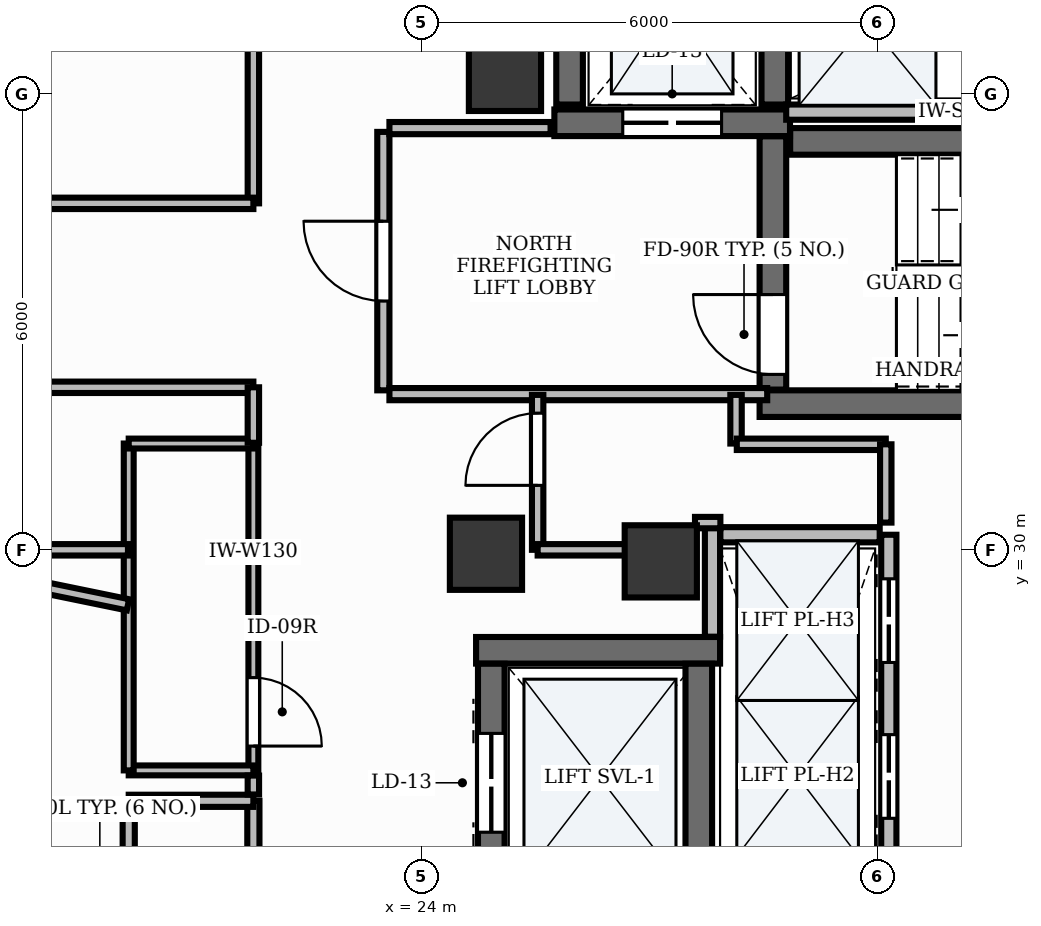
"""IFC4 building model, lengths in metres.
Left out: names, types, materials, properties, quantities, classifications, styles, units other than length and angle.
Written with IfcOpenShell. Run it as: python <this file> out.ifc"""

import sys

from ifc_helpers import new_model, si_unit, direction, frame, frame_2d, origin, origin_2d, place, context, subcontext, project, spatial, rectangle, extrude, element, fill, save


model = new_model("IFC4")
c1 = context("Model", 3, precision=1e-05, world=origin(), true_north=direction((0.0, 1.0)))
c2 = subcontext(c1, "Body", "Model", "MODEL_VIEW")
j1 = project(units=[si_unit("LENGTHUNIT", "METRE"), si_unit("PLANEANGLEUNIT", "RADIAN")], contexts=[c1])
p1 = place(None, origin())
s1 = spatial("IfcSite", under=j1, at=p1, CompositionType="ELEMENT")
p2 = place(p1, origin())
s2 = spatial("IfcBuilding", under=s1, at=p2, CompositionType="ELEMENT")
p3 = place(p2, frame((0.0, 0.0, 318.6)))
s3 = spatial("IfcBuildingStorey", under=s2, at=p3, CompositionType="ELEMENT", Elevation=318.6)
p4 = place(p3, frame((28.852, 35.375, 0.0), z_axis=(0.0, 0.0, 1.0), x_axis=(1.0, 0.0, 0.0)))
e1 = element("IfcWall", 1, at=p4, inside=s3, PredefinedType="SHEAR", context=c2, shape_type="SweptSolid", body=[
    extrude(rectangle(XDim=8.148, YDim=0.35, at=frame_2d((4.074, 0.0))), origin(), (0.0, 0.0, 1.0), 3.79),
])
p5 = place(p3, frame((28.45, 31.925, 0.0), z_axis=(0.0, 0.0, 1.0), x_axis=(1.0, 0.0, 0.0)))
e2 = element("IfcWall", 2, at=p5, inside=s3, PredefinedType="SHEAR", context=c2, shape_type="SweptSolid", body=[
    extrude(rectangle(XDim=8.55, YDim=0.35, at=frame_2d((4.275, 0.0))), origin(), (0.0, 0.0, 1.0), 3.79),
])
p6 = place(p3, frame((28.625, 32.11, 0.0), z_axis=(0.0, 0.0, 1.0), x_axis=(0.0, 1.0, 0.0)))
e3 = element("IfcWall", 3, at=p6, inside=s3, PredefinedType="SHEAR", context=c2, shape_type="SweptSolid", body=[
    extrude(rectangle(XDim=3.333, YDim=0.35, at=frame_2d((1.667, 0.0))), origin(), (0.0, 0.0, 1.0), 3.79),
])
p7 = place(p6, frame((0.2, 0.0, 0.0)))
e4 = element("IfcOpeningElement", 4, at=p7, cuts=e3, PredefinedType="OPENING", context=c2, shape_type="SweptSolid", body=[
    extrude(rectangle(XDim=1.05, YDim=2.15, at=frame_2d((0.525, 1.075))), frame((0.0, 0.19, 0.0), z_axis=(0.0, -1.0, 0.0), x_axis=(1.0, 0.0, 0.0)), (0.0, 0.0, 1.0), 0.38),
])
p8 = place(p3, frame((25.75, 35.62, 0.0), z_axis=(0.0, 0.0, 1.0), x_axis=(1.0, 0.0, 0.0)))
e5 = element("IfcWall", 5, at=p8, inside=s3, PredefinedType="SHEAR", context=c2, shape_type="SweptSolid", body=[
    extrude(rectangle(XDim=3.1, YDim=0.35, at=frame_2d((1.55, 0.0))), origin(), (0.0, 0.0, 1.0), 3.79),
])
p9 = place(p8, frame((0.9, 0.0, 0.0)))
e6 = element("IfcOpeningElement", 6, at=p9, cuts=e5, PredefinedType="OPENING", context=c2, shape_type="SweptSolid", body=[
    extrude(rectangle(XDim=1.3, YDim=2.2, at=frame_2d((0.65, 1.1))), frame((0.0, 0.19, 0.0), z_axis=(0.0, -1.0, 0.0), x_axis=(1.0, 0.0, 0.0)), (0.0, 0.0, 1.0), 0.38),
])
for number, where, z_axis, x_axis in (
    (7, (25.95, 35.86, 0.0), (0.0, 0.0, 1.0), (0.0, 1.0, 0.0)),
    (8, (28.65, 35.86, 0.0), (0.0, 0.0, 1.0), (0.0, 1.0, 0.0)),
):
    element("IfcWall", number, at=place(p3, frame(where, z_axis=z_axis, x_axis=x_axis)), inside=s3, PredefinedType="SHEAR", context=c2, shape_type="SweptSolid", body=[
        extrude(rectangle(XDim=2.7, YDim=0.35, at=frame_2d((1.35, 0.0))), origin(), (0.0, 0.0, 1.0), 3.79),
    ])
p10 = place(p3, frame((24.72, 28.68, 0.0), z_axis=(0.0, 0.0, 1.0), x_axis=(1.0, 0.0, 0.0)))
e9 = element("IfcWall", 9, at=p10, inside=s3, PredefinedType="SHEAR", context=c2, shape_type="SweptSolid", body=[
    extrude(rectangle(XDim=3.21, YDim=0.35, at=frame_2d((1.605, 0.0))), origin(), (0.0, 0.0, 1.0), 3.79),
])
p11 = place(p3, frame((24.92, 25.497, 0.0), z_axis=(0.0, 0.0, 1.0), x_axis=(0.0, 1.0, 0.0)))
e10 = element("IfcWall", 10, at=p11, inside=s3, PredefinedType="SHEAR", context=c2, shape_type="SweptSolid", body=[
    extrude(rectangle(XDim=3.006, YDim=0.35, at=frame_2d((1.503, 0.0))), origin(), (0.0, 0.0, 1.0), 3.79),
])
p12 = place(p11, frame((0.79, 0.0, 0.0)))
e11 = element("IfcOpeningElement", 11, at=p12, cuts=e10, PredefinedType="OPENING", context=c2, shape_type="SweptSolid", body=[
    extrude(rectangle(XDim=1.3, YDim=2.2, at=frame_2d((0.65, 1.1))), frame((0.0, 0.19, 0.0), z_axis=(0.0, -1.0, 0.0), x_axis=(1.0, 0.0, 0.0)), (0.0, 0.0, 1.0), 0.38),
])
p13 = place(p3, frame((27.65, 25.497, 0.0), z_axis=(0.0, 0.0, 1.0), x_axis=(0.0, 1.0, 0.0)))
e12 = element("IfcWall", 12, at=p13, inside=s3, PredefinedType="SHEAR", context=c2, shape_type="SweptSolid", body=[
    extrude(rectangle(XDim=3.006, YDim=0.35, at=frame_2d((1.503, 0.0))), origin(), (0.0, 0.0, 1.0), 3.79),
])
for number, where, z_axis, x_axis in (
    (13, (25.1, 36.25, -0.0), (0.0, 0.0, 1.0), (1.0, 0.0, 0.0)),
    (14, (24.85, 29.95, -0.0), (0.0, 0.0, 1.0), (1.0, 0.0, 0.0)),
    (15, (27.15, 29.85, -0.0), (0.0, 0.0, 1.0), (1.0, 0.0, 0.0)),
):
    element("IfcColumn", number, at=place(p3, frame(where, z_axis=z_axis, x_axis=x_axis)), inside=s3, PredefinedType="PILASTER", context=c2, shape_type="SweptSolid", body=[
        extrude(rectangle(XDim=0.95, YDim=0.95, at=origin_2d()), origin(), (0.0, 0.0, 1.0), 3.791),
    ])
p14 = place(p3, frame((27.83, 28.859, 0.0), z_axis=(0.0, 0.0, 1.0), x_axis=(0.0, 1.0, 0.0)))
e16 = element("IfcWall", 16, at=p14, inside=s3, PredefinedType="PARTITIONING", context=c2, shape_type="SweptSolid", body=[
    extrude(rectangle(XDim=1.441, YDim=0.2, at=frame_2d((0.721, 0.0))), origin(), (0.0, 0.0, 1.0), 2.8),
])
p15 = place(p3, frame((30.15, 23.85, 0.0), z_axis=(0.0, 0.0, 1.0), x_axis=(0.0, 1.0, 0.0)))
e17 = element("IfcWall", 17, at=p15, inside=s3, PredefinedType="PARTITIONING", context=c2, shape_type="SweptSolid", body=[
    extrude(rectangle(XDim=6.35, YDim=0.2, at=frame_2d((3.175, 0.0))), origin(), (0.0, 0.0, 1.0), 2.8),
])
p16 = place(p15, frame((0.58, 0.0, 0.0)))
e18 = element("IfcOpeningElement", 18, at=p16, cuts=e17, PredefinedType="OPENING", context=c2, shape_type="SweptSolid", body=[
    extrude(rectangle(XDim=1.1, YDim=2.2, at=frame_2d((0.55, 1.1))), frame((0.0, 0.115, 0.0), z_axis=(0.0, -1.0, 0.0), x_axis=(1.0, 0.0, 0.0)), (0.0, 0.0, 1.0), 0.23),
])
p17 = place(p15, frame((2.62, 0.0, 0.0)))
e19 = element("IfcOpeningElement", 19, at=p17, cuts=e17, PredefinedType="OPENING", context=c2, shape_type="SweptSolid", body=[
    extrude(rectangle(XDim=1.1, YDim=2.2, at=frame_2d((0.55, 1.1))), frame((0.0, 0.115, 0.0), z_axis=(0.0, -1.0, 0.0), x_axis=(1.0, 0.0, 0.0)), (0.0, 0.0, 1.0), 0.23),
])
p18 = place(p15, frame((4.67, 0.0, 0.0)))
e20 = element("IfcOpeningElement", 20, at=p18, cuts=e17, PredefinedType="OPENING", context=c2, shape_type="SweptSolid", body=[
    extrude(rectangle(XDim=1.1, YDim=2.2, at=frame_2d((0.55, 1.1))), frame((0.0, 0.115, 0.0), z_axis=(0.0, -1.0, 0.0), x_axis=(1.0, 0.0, 0.0)), (0.0, 0.0, 1.0), 0.23),
])
p19 = place(p3, frame((27.934, 30.2, 0.0), z_axis=(0.0, 0.0, 1.0), x_axis=(1.0, 0.0, 0.0)))
e21 = element("IfcWall", 21, at=p19, inside=s3, PredefinedType="PARTITIONING", context=c2, shape_type="SweptSolid", body=[
    extrude(rectangle(XDim=2.096, YDim=0.2, at=frame_2d((1.048, 0.0))), origin(), (0.0, 0.0, 1.0), 2.8),
])
p20 = place(p3, frame((28.8, 35.76, 0.0), z_axis=(0.0, 0.0, 1.0), x_axis=(1.0, 0.0, 0.0)))
e22 = element("IfcWall", 22, at=p20, inside=s3, PredefinedType="PARTITIONING", context=c2, shape_type="SweptSolid", body=[
    extrude(rectangle(XDim=4.57, YDim=0.2, at=frame_2d((2.285, 0.0))), origin(), (0.0, 0.0, 1.0), 2.8),
])
p21 = place(p3, frame((23.5, 32.1, 0.0), z_axis=(0.0, 0.0, 1.0), x_axis=(0.0, 1.0, 0.0)))
e23 = element("IfcWall", 23, at=p21, inside=s3, PredefinedType="PARTITIONING", context=c2, shape_type="SweptSolid", body=[
    extrude(rectangle(XDim=3.4, YDim=0.16, at=frame_2d((1.7, 0.0))), origin(), (0.0, 0.0, 1.0), 2.8),
])
p22 = place(p21, frame((1.175, 0.0, 0.0)))
e24 = element("IfcOpeningElement", 24, at=p22, cuts=e23, PredefinedType="OPENING", context=c2, shape_type="SweptSolid", body=[
    extrude(rectangle(XDim=1.05, YDim=2.15, at=frame_2d((0.525, 1.075))), frame((0.0, 0.095, 0.0), z_axis=(0.0, -1.0, 0.0), x_axis=(1.0, 0.0, 0.0)), (0.0, 0.0, 1.0), 0.19),
])
p23 = place(p3, frame((23.58, 32.05, 0.0), z_axis=(0.0, 0.0, 1.0), x_axis=(1.0, 0.0, 0.0)))
e25 = element("IfcWall", 25, at=p23, inside=s3, PredefinedType="PARTITIONING", context=c2, shape_type="SweptSolid", body=[
    extrude(rectangle(XDim=4.97, YDim=0.16, at=frame_2d((2.485, 0.0))), origin(), (0.0, 0.0, 1.0), 2.8),
])
p24 = place(p3, frame((23.58, 35.55, 0.0), z_axis=(0.0, 0.0, 1.0), x_axis=(1.0, 0.0, 0.0)))
e26 = element("IfcWall", 26, at=p24, inside=s3, PredefinedType="PARTITIONING", context=c2, shape_type="SweptSolid", body=[
    extrude(rectangle(XDim=2.12, YDim=0.16, at=frame_2d((1.06, 0.0))), origin(), (0.0, 0.0, 1.0), 2.8),
])
p25 = place(p3, frame((20.15, 22.4, 0.0), z_axis=(0.0, 0.0, 1.0), x_axis=(0.0, 1.0, 0.0)))
e27 = element("IfcWall", 27, at=p25, inside=s3, PredefinedType="PARTITIONING", context=c2, shape_type="SweptSolid", body=[
    extrude(rectangle(XDim=4.3, YDim=0.16, at=frame_2d((2.15, 0.0))), origin(), (0.0, 0.0, 1.0), 2.8),
])
p26 = place(p25, frame((2.62, 0.0, 0.0)))
e28 = element("IfcOpeningElement", 28, at=p26, cuts=e27, PredefinedType="OPENING", context=c2, shape_type="SweptSolid", body=[
    extrude(rectangle(XDim=0.95, YDim=2.15, at=frame_2d((0.475, 1.075))), frame((0.0, 0.095, 0.0), z_axis=(0.0, -1.0, 0.0), x_axis=(1.0, 0.0, 0.0)), (0.0, 0.0, 1.0), 0.19),
])
p27 = place(p3, frame((21.79, 31.4, 0.0), z_axis=(0.0, 0.0, 1.0), x_axis=(0.0, -1.0, 0.0)))
e29 = element("IfcWall", 29, at=p27, inside=s3, PredefinedType="PARTITIONING", context=c2, shape_type="SweptSolid", body=[
    extrude(rectangle(XDim=4.3, YDim=0.13, at=frame_2d((2.15, 0.0))), origin(), (0.0, 0.0, 1.0), 2.8),
])
p28 = place(p27, frame((3.08, 0.0, 0.0)))
e30 = element("IfcOpeningElement", 30, at=p28, cuts=e29, PredefinedType="OPENING", context=c2, shape_type="SweptSolid", body=[
    extrude(rectangle(XDim=0.9, YDim=2.15, at=frame_2d((0.45, 1.075))), frame((0.0, 0.08, 0.0), z_axis=(0.0, -1.0, 0.0), x_axis=(1.0, 0.0, 0.0)), (0.0, 0.0, 1.0), 0.16),
])
p29 = place(p3, frame((25.53, 30.002, 0.0), z_axis=(0.0, 0.0, 1.0), x_axis=(0.0, 1.0, 0.0)))
e31 = element("IfcWall", 31, at=p29, inside=s3, PredefinedType="PARTITIONING", context=c2, shape_type="SweptSolid", body=[
    extrude(rectangle(XDim=2.038, YDim=0.15, at=frame_2d((1.019, 0.0))), origin(), (0.0, 0.0, 1.0), 2.8),
])
p30 = place(p29, frame((0.848, 0.0, 0.0)))
e32 = element("IfcOpeningElement", 32, at=p30, cuts=e31, PredefinedType="OPENING", context=c2, shape_type="SweptSolid", body=[
    extrude(rectangle(XDim=0.95, YDim=2.15, at=frame_2d((0.475, 1.075))), frame((0.0, 0.09, 0.0), z_axis=(0.0, -1.0, 0.0), x_axis=(1.0, 0.0, 0.0)), (0.0, 0.0, 1.0), 0.18),
])
p31 = place(p3, frame((17.8, 32.14, 0.0), z_axis=(0.0, 0.0, 1.0), x_axis=(1.0, 0.0, 0.0)))
e33 = element("IfcWall", 33, at=p31, inside=s3, PredefinedType="PARTITIONING", context=c2, shape_type="SweptSolid", body=[
    extrude(rectangle(XDim=3.99, YDim=0.15, at=frame_2d((1.995, 0.0))), origin(), (0.0, 0.0, 1.0), 2.8),
])
p32 = place(p31, frame((0.33, 0.0, 0.0)))
e34 = element("IfcOpeningElement", 34, at=p32, cuts=e33, PredefinedType="OPENING", context=c2, shape_type="SweptSolid", body=[
    extrude(rectangle(XDim=0.95, YDim=2.15, at=frame_2d((0.475, 1.075))), frame((0.0, 0.09, 0.0), z_axis=(0.0, -1.0, 0.0), x_axis=(1.0, 0.0, 0.0)), (0.0, 0.0, 1.0), 0.18),
])
p33 = place(p3, frame((21.79, 26.7, 0.0), z_axis=(0.0, 0.0, 1.0), x_axis=(0.0, -1.0, 0.0)))
e35 = element("IfcWall", 35, at=p33, inside=s3, PredefinedType="PARTITIONING", context=c2, shape_type="SweptSolid", body=[
    extrude(rectangle(XDim=4.3, YDim=0.16, at=frame_2d((2.15, 0.0))), origin(), (0.0, 0.0, 1.0), 2.8),
])
p34 = place(p3, frame((20.15, 26.7, 0.0), z_axis=(0.0, 0.0, 1.0), x_axis=(1.0, 0.0, 0.0)))
e36 = element("IfcWall", 36, at=p34, inside=s3, PredefinedType="PARTITIONING", context=c2, shape_type="SweptSolid", body=[
    extrude(rectangle(XDim=1.64, YDim=0.16, at=frame_2d((0.82, 0.0))), origin(), (0.0, 0.0, 1.0), 2.8),
])
p35 = place(p3, frame((21.79, 27.1, 0.0), z_axis=(0.0, 0.0, 1.0), x_axis=(-1.0, 0.0, 0.0)))
e37 = element("IfcWall", 37, at=p35, inside=s3, PredefinedType="PARTITIONING", context=c2, shape_type="SweptSolid", body=[
    extrude(rectangle(XDim=1.64, YDim=0.13, at=frame_2d((0.82, 0.0))), origin(), (0.0, 0.0, 1.0), 2.8),
])
p36 = place(p3, frame((20.15, 27.1, 0.0), z_axis=(0.0, 0.0, 1.0), x_axis=(0.0, 1.0, 0.0)))
e38 = element("IfcWall", 38, at=p36, inside=s3, PredefinedType="PARTITIONING", context=c2, shape_type="SweptSolid", body=[
    extrude(rectangle(XDim=4.3, YDim=0.13, at=frame_2d((2.15, 0.0))), origin(), (0.0, 0.0, 1.0), 2.8),
])
p37 = place(p3, frame((20.15, 31.4, 0.0), z_axis=(0.0, 0.0, 1.0), x_axis=(1.0, 0.0, 0.0)))
e39 = element("IfcWall", 39, at=p37, inside=s3, PredefinedType="PARTITIONING", context=c2, shape_type="SweptSolid", body=[
    extrude(rectangle(XDim=1.64, YDim=0.13, at=frame_2d((0.82, 0.0))), origin(), (0.0, 0.0, 1.0), 2.8),
])
p38 = place(p3, frame((28.14, 32.04, 0.0), z_axis=(0.0, 0.0, 1.0), x_axis=(0.0, -1.0, 0.0)))
e40 = element("IfcWall", 40, at=p38, inside=s3, PredefinedType="PARTITIONING", context=c2, shape_type="SweptSolid", body=[
    extrude(rectangle(XDim=0.64, YDim=0.15, at=frame_2d((0.32, 0.0))), origin(), (0.0, 0.0, 1.0), 2.8),
])
p39 = place(p3, frame((28.15, 31.39, 0.0), z_axis=(0.0, 0.0, 1.0), x_axis=(1.0, 0.0, 0.0)))
e41 = element("IfcWall", 41, at=p39, inside=s3, PredefinedType="PARTITIONING", context=c2, shape_type="SweptSolid", body=[
    extrude(rectangle(XDim=1.96, YDim=0.15, at=frame_2d((0.98, 0.0))), origin(), (0.0, 0.0, 1.0), 2.8),
])
p40 = place(p3, frame((30.11, 31.39, 0.0), z_axis=(0.0, 0.0, 1.0), x_axis=(0.0, -1.0, 0.0)))
e42 = element("IfcWall", 42, at=p40, inside=s3, PredefinedType="PARTITIONING", context=c2, shape_type="SweptSolid", body=[
    extrude(rectangle(XDim=1.03, YDim=0.15, at=frame_2d((0.515, 0.0))), origin(), (0.0, 0.0, 1.0), 2.8),
])
p41 = place(p3, frame((27.934, 30.36, 0.0), z_axis=(0.0, 0.0, 1.0), x_axis=(-1.0, 0.0, 0.0)))
e43 = element("IfcWall", 43, at=p41, inside=s3, PredefinedType="PARTITIONING", context=c2, shape_type="SweptSolid", body=[
    extrude(rectangle(XDim=0.334, YDim=0.15, at=frame_2d((0.167, 0.0))), origin(), (0.0, 0.0, 1.0), 2.8),
])
p42 = place(p3, frame((27.59, 30.002, 0.0), z_axis=(0.0, 0.0, 1.0), x_axis=(-1.0, 0.0, 0.0)))
e44 = element("IfcWall", 44, at=p42, inside=s3, PredefinedType="PARTITIONING", context=c2, shape_type="SweptSolid", body=[
    extrude(rectangle(XDim=2.06, YDim=0.15, at=frame_2d((1.03, 0.0))), origin(), (0.0, 0.0, 1.0), 2.8),
])
p43 = place(p3, frame((21.79, 37.466, 0.0), z_axis=(0.0, 0.0, 1.0), x_axis=(0.0, -1.0, 0.0)))
e45 = element("IfcWall", 45, at=p43, inside=s3, PredefinedType="PARTITIONING", context=c2, shape_type="SweptSolid", body=[
    extrude(rectangle(XDim=2.906, YDim=0.15, at=frame_2d((1.453, 0.0))), origin(), (0.0, 0.0, 1.0), 2.8),
])
p44 = place(p3, frame((21.79, 34.56, 0.0), z_axis=(0.0, 0.0, 1.0), x_axis=(-1.0, 0.0, 0.0)))
e46 = element("IfcWall", 46, at=p44, inside=s3, PredefinedType="PARTITIONING", context=c2, shape_type="SweptSolid", body=[
    extrude(rectangle(XDim=3.99, YDim=0.15, at=frame_2d((1.995, 0.0))), origin(), (0.0, 0.0, 1.0), 2.8),
])
p45 = place(p3, frame((21.79, 32.14, 0.0), z_axis=(0.0, 0.0, 1.0), x_axis=(0.0, -1.0, 0.0)))
e47 = element("IfcWall", 47, at=p45, inside=s3, PredefinedType="PARTITIONING", context=c2, shape_type="SweptSolid", body=[
    extrude(rectangle(XDim=0.73, YDim=0.15, at=frame_2d((0.365, 0.0))), origin(), (0.0, 0.0, 1.0), 2.8),
])
p46 = place(p3, frame((20.14, 30.002, 0.0), z_axis=(0.0, 0.0, 1.0), x_axis=(-1.0, 0.0, 0.0)))
e48 = element("IfcWall", 48, at=p46, inside=s3, PredefinedType="PARTITIONING", context=c2, shape_type="SweptSolid", body=[
    extrude(rectangle(XDim=3.485, YDim=0.15, at=frame_2d((1.743, 0.0))), origin(), (0.0, 0.0, 1.0), 2.8),
])
p47 = place(p3, frame((17.784, 29.762, 0.0), z_axis=(0.0, 0.0, 1.0), x_axis=(0.979588350518, -0.201014087887, 0.0)))
e49 = element("IfcWall", 49, at=p47, inside=s3, PredefinedType="PARTITIONING", context=c2, shape_type="SweptSolid", body=[
    extrude(rectangle(XDim=2.405, YDim=0.15, at=frame_2d((1.202, 0.0))), origin(), (0.0, 0.0, 1.0), 2.8),
])
p48 = place(p3, frame((21.79, 27.032, 0.0), z_axis=(0.0, 0.0, 1.0), x_axis=(0.0, -1.0, 0.0)))
e50 = element("IfcWall", 50, at=p48, inside=s3, PredefinedType="PARTITIONING", context=c2, shape_type="SweptSolid", body=[
    extrude(rectangle(XDim=0.249, YDim=0.15, at=frame_2d((0.125, 0.0))), origin(), (0.0, 0.0, 1.0), 2.8),
])
p49 = place(p7, origin())
e51 = element("IfcDoor", 51, at=p49, inside=s3, OperationType="SINGLE_SWING_RIGHT", PredefinedType="DOOR", context=c2, shape_type="SweptSolid", body=[
    extrude(rectangle(XDim=1.05, YDim=2.15, at=frame_2d((0.525, 1.075))), frame((0.0, 0.025, 0.0), z_axis=(0.0, -1.0, 0.0), x_axis=(1.0, 0.0, 0.0)), (0.0, 0.0, 1.0), 0.05),
])
fill(e4, e51)
p50 = place(p17, origin())
e52 = element("IfcDoor", 52, at=p50, inside=s3, OperationType="DOUBLE_DOOR_SLIDING", PredefinedType="DOOR", context=c2, shape_type="SweptSolid", body=[
    extrude(rectangle(XDim=1.1, YDim=2.2, at=frame_2d((0.55, 1.1))), frame((0.0, 0.025, 0.0), z_axis=(0.0, -1.0, 0.0), x_axis=(1.0, 0.0, 0.0)), (0.0, 0.0, 1.0), 0.05),
])
fill(e19, e52)
p51 = place(p18, origin())
e53 = element("IfcDoor", 53, at=p51, inside=s3, OperationType="DOUBLE_DOOR_SLIDING", PredefinedType="DOOR", context=c2, shape_type="SweptSolid", body=[
    extrude(rectangle(XDim=1.1, YDim=2.2, at=frame_2d((0.55, 1.1))), frame((0.0, 0.025, 0.0), z_axis=(0.0, -1.0, 0.0), x_axis=(1.0, 0.0, 0.0)), (0.0, 0.0, 1.0), 0.05),
])
fill(e20, e53)
p52 = place(p9, origin())
e54 = element("IfcDoor", 54, at=p52, inside=s3, OperationType="DOUBLE_DOOR_SLIDING", PredefinedType="DOOR", context=c2, shape_type="SweptSolid", body=[
    extrude(rectangle(XDim=1.3, YDim=2.2, at=frame_2d((0.65, 1.1))), frame((0.0, 0.025, 0.0), z_axis=(0.0, -1.0, 0.0), x_axis=(1.0, 0.0, 0.0)), (0.0, 0.0, 1.0), 0.05),
])
fill(e6, e54)
p53 = place(p12, origin())
e55 = element("IfcDoor", 55, at=p53, inside=s3, OperationType="DOUBLE_DOOR_SLIDING", PredefinedType="DOOR", context=c2, shape_type="SweptSolid", body=[
    extrude(rectangle(XDim=1.3, YDim=2.2, at=frame_2d((0.65, 1.1))), frame((0.0, 0.025, 0.0), z_axis=(0.0, -1.0, 0.0), x_axis=(1.0, 0.0, 0.0)), (0.0, 0.0, 1.0), 0.05),
])
fill(e11, e55)
p54 = place(p22, origin())
e56 = element("IfcDoor", 56, at=p54, inside=s3, OperationType="SINGLE_SWING_RIGHT", PredefinedType="DOOR", context=c2, shape_type="SweptSolid", body=[
    extrude(rectangle(XDim=1.05, YDim=2.15, at=frame_2d((0.525, 1.075))), frame((0.0, 0.025, 0.0), z_axis=(0.0, -1.0, 0.0), x_axis=(1.0, 0.0, 0.0)), (0.0, 0.0, 1.0), 0.05),
])
fill(e24, e56)
p55 = place(p28, origin())
e57 = element("IfcDoor", 57, at=p55, inside=s3, OperationType="SINGLE_SWING_RIGHT", PredefinedType="DOOR", context=c2, shape_type="SweptSolid", body=[
    extrude(rectangle(XDim=0.9, YDim=2.15, at=frame_2d((0.45, 1.075))), frame((0.0, 0.025, 0.0), z_axis=(0.0, -1.0, 0.0), x_axis=(1.0, 0.0, 0.0)), (0.0, 0.0, 1.0), 0.05),
])
fill(e30, e57)
p56 = place(p30, origin())
e58 = element("IfcDoor", 58, at=p56, inside=s3, OperationType="SINGLE_SWING_LEFT", PredefinedType="DOOR", context=c2, shape_type="SweptSolid", body=[
    extrude(rectangle(XDim=0.95, YDim=2.15, at=frame_2d((0.475, 1.075))), frame((0.0, 0.025, 0.0), z_axis=(0.0, -1.0, 0.0), x_axis=(1.0, 0.0, 0.0)), (0.0, 0.0, 1.0), 0.05),
])
fill(e32, e58)
save(model, sys.argv[1])
